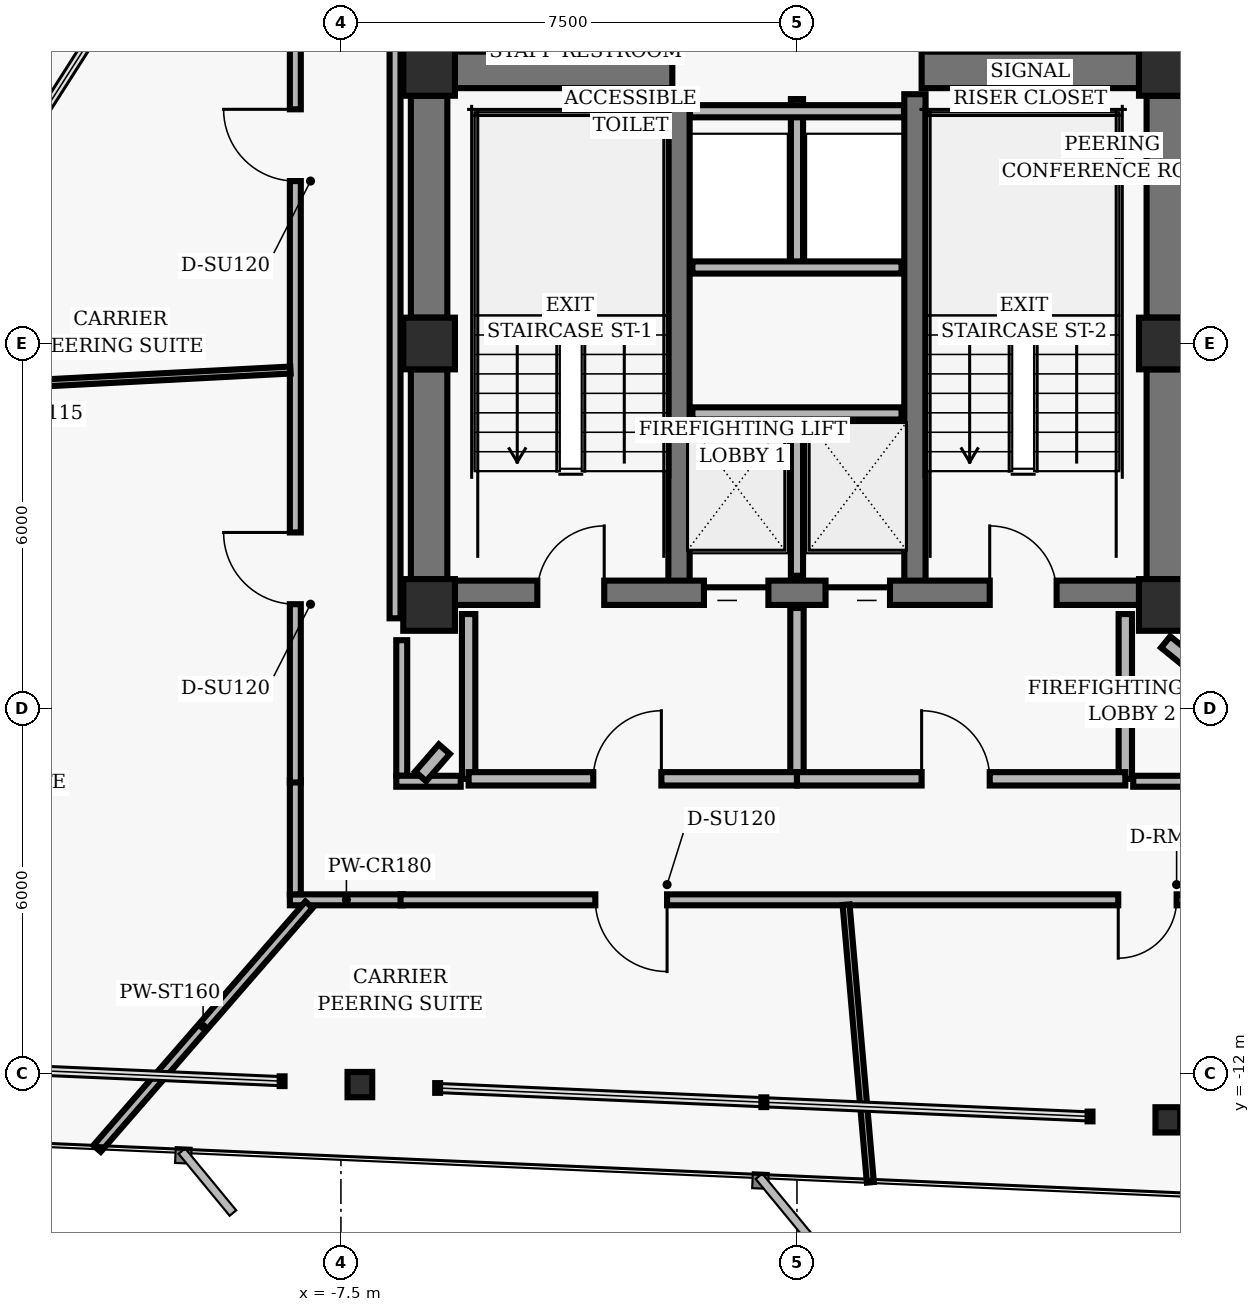
"""IFC4 building model, lengths in metres.
Left out: names, types, materials, properties, quantities, classifications, styles, units other than length and angle.
Written with IfcOpenShell. Run it as: python <this file> out.ifc"""

import sys

from ifc_helpers import new_model, si_unit, direction, frame, frame_2d, origin, origin_2d, place, context, subcontext, project, spatial, rectangle, hollow_rectangle, i_section, extrude, element, fill, save


model = new_model("IFC4")
c1 = context("Model", 3, precision=1e-05, world=origin(), true_north=direction((0.0, 1.0)))
c2 = subcontext(c1, "Body", "Model", "MODEL_VIEW")
j1 = project(units=[si_unit("LENGTHUNIT", "METRE"), si_unit("PLANEANGLEUNIT", "RADIAN")], contexts=[c1])
p1 = place(None, origin())
s1 = spatial("IfcSite", under=j1, at=p1, CompositionType="ELEMENT")
p2 = place(p1, origin())
s2 = spatial("IfcBuilding", under=s1, at=p2, CompositionType="ELEMENT")
p3 = place(p2, frame((0.0, 0.0, 128.96)))
s3 = spatial("IfcBuildingStorey", under=s2, at=p3, CompositionType="ELEMENT", Elevation=128.96)
for number, where, z_axis, x_axis in (
    (1, (-6.05, 4.5, 0.0), (0.0, 0.0, 1.0), (1.0, 0.0, 0.0)),
    (2, (6.05, 4.5, 0.0), (0.0, 0.0, 1.0), (1.0, 0.0, 0.0)),
    (3, (-6.05, 0.0, 0.0), (0.0, 0.0, 1.0), (1.0, 0.0, 0.0)),
    (4, (6.05, 0.0, 0.0), (0.0, 0.0, 1.0), (1.0, 0.0, 0.0)),
    (5, (-6.05, -4.3, 0.0), (0.0, 0.0, 1.0), (1.0, 0.0, 0.0)),
    (6, (6.05, -4.3, 0.0), (0.0, 0.0, 1.0), (1.0, 0.0, 0.0)),
):
    element("IfcColumn", number, at=place(p3, frame(where, z_axis=z_axis, x_axis=x_axis)), inside=s3, PredefinedType="COLUMN", context=c2, shape_type="SweptSolid", body=[
        extrude(hollow_rectangle(XDim=0.85, YDim=0.85, WallThickness=0.055, InnerFilletRadius=0.02, OuterFilletRadius=0.04, at=origin_2d()), origin(), (0.0, 0.0, 1.0), 3.04),
    ])
p4 = place(p3, frame((-6.05, 0.425, 0.0), z_axis=(0.0, 0.0, 1.0), x_axis=(0.0, 1.0, 0.0)))
e7 = element("IfcWall", 7, at=p4, inside=s3, PredefinedType="SHEAR", context=c2, shape_type="SweptSolid", body=[
    extrude(rectangle(XDim=3.65, YDim=0.6, at=frame_2d((1.825, 0.0))), origin(), (0.0, 0.0, 1.0), 2.788),
])
p5 = place(p3, frame((-6.05, -3.875, 0.0), z_axis=(0.0, 0.0, 1.0), x_axis=(0.0, 1.0, 0.0)))
e8 = element("IfcWall", 8, at=p5, inside=s3, PredefinedType="SHEAR", context=c2, shape_type="SweptSolid", body=[
    extrude(rectangle(XDim=3.45, YDim=0.6, at=frame_2d((1.725, 0.0))), origin(), (0.0, 0.0, 1.0), 2.788),
])
p6 = place(p3, frame((6.05, 0.425, 0.0), z_axis=(0.0, 0.0, 1.0), x_axis=(0.0, 1.0, 0.0)))
e9 = element("IfcWall", 9, at=p6, inside=s3, PredefinedType="SHEAR", context=c2, shape_type="SweptSolid", body=[
    extrude(rectangle(XDim=3.65, YDim=0.6, at=frame_2d((1.825, 0.0))), origin(), (0.0, 0.0, 1.0), 2.788),
])
p7 = place(p3, frame((6.05, -3.875, 0.0), z_axis=(0.0, 0.0, 1.0), x_axis=(0.0, 1.0, 0.0)))
e10 = element("IfcWall", 10, at=p7, inside=s3, PredefinedType="SHEAR", context=c2, shape_type="SweptSolid", body=[
    extrude(rectangle(XDim=3.45, YDim=0.6, at=frame_2d((1.725, 0.0))), origin(), (0.0, 0.0, 1.0), 2.788),
])
for number, where, z_axis, x_axis in (
    (11, (-1.94, -4.1, 0.0), (0.0, 0.0, 1.0), (0.0, 1.0, 0.0)),
    (12, (1.94, -4.1, 0.0), (0.0, 0.0, 1.0), (0.0, 1.0, 0.0)),
):
    element("IfcWall", number, at=place(p3, frame(where, z_axis=z_axis, x_axis=x_axis)), inside=s3, PredefinedType="SHEAR", context=c2, shape_type="SweptSolid", body=[
        extrude(rectangle(XDim=8.2, YDim=0.35, at=frame_2d((4.1, 0.0))), origin(), (0.0, 0.0, 1.0), 2.788),
    ])
p8 = place(p3, frame((-5.625, -4.1, 0.0), z_axis=(0.0, 0.0, 1.0), x_axis=(1.0, 0.0, 0.0)))
e13 = element("IfcWall", 13, at=p8, inside=s3, PredefinedType="SHEAR", context=c2, shape_type="SweptSolid", body=[
    extrude(rectangle(XDim=11.25, YDim=0.4, at=frame_2d((5.625, 0.0))), origin(), (0.0, 0.0, 1.0), 2.788),
])
p9 = place(p8, frame((1.355, 0.0, 0.0)))
e14 = element("IfcOpeningElement", 14, at=p9, cuts=e13, PredefinedType="OPENING", context=c2, shape_type="SweptSolid", body=[
    extrude(rectangle(XDim=1.1, YDim=2.04, at=frame_2d((0.55, 1.02))), frame((0.0, 0.21, 0.0), z_axis=(0.0, -1.0, 0.0), x_axis=(1.0, 0.0, 0.0)), (0.0, 0.0, 1.0), 0.42),
])
p10 = place(p8, frame((8.795, 0.0, 0.0)))
e15 = element("IfcOpeningElement", 15, at=p10, cuts=e13, PredefinedType="OPENING", context=c2, shape_type="SweptSolid", body=[
    extrude(rectangle(XDim=1.1, YDim=2.04, at=frame_2d((0.55, 1.02))), frame((0.0, 0.21, 0.0), z_axis=(0.0, -1.0, 0.0), x_axis=(1.0, 0.0, 0.0)), (0.0, 0.0, 1.0), 0.42),
])
p11 = place(p8, frame((4.095, 0.0, 0.0)))
e16 = element("IfcOpeningElement", 16, at=p11, cuts=e13, PredefinedType="OPENING", context=c2, shape_type="SweptSolid", body=[
    extrude(rectangle(XDim=1.06, YDim=2.04, at=frame_2d((0.53, 1.02))), frame((0.0, 0.21, 0.0), z_axis=(0.0, -1.0, 0.0), x_axis=(1.0, 0.0, 0.0)), (0.0, 0.0, 1.0), 0.42),
])
p12 = place(p8, frame((6.095, 0.0, 0.0)))
e17 = element("IfcOpeningElement", 17, at=p12, cuts=e13, PredefinedType="OPENING", context=c2, shape_type="SweptSolid", body=[
    extrude(rectangle(XDim=1.06, YDim=2.04, at=frame_2d((0.53, 1.02))), frame((0.0, 0.21, 0.0), z_axis=(0.0, -1.0, 0.0), x_axis=(1.0, 0.0, 0.0)), (0.0, 0.0, 1.0), 0.42),
])
for number, where, z_axis, x_axis in (
    (18, (-5.625, 4.5, 0.0), (0.0, 0.0, 1.0), (1.0, 0.0, 0.0)),
    (19, (2.05, 4.5, 0.0), (0.0, 0.0, 1.0), (1.0, 0.0, 0.0)),
):
    element("IfcWall", number, at=place(p3, frame(where, z_axis=z_axis, x_axis=x_axis)), inside=s3, PredefinedType="SHEAR", context=c2, shape_type="SweptSolid", body=[
        extrude(rectangle(XDim=3.575, YDim=0.6, at=frame_2d((1.788, 0.0))), origin(), (0.0, 0.0, 1.0), 2.788),
    ])
for number, where, z_axis, x_axis in (
    (20, (-7.188, -12.189, 0.0), (0.0, 0.0, 1.0), (1.0, 0.0, 0.0)),
    (21, (6.099, -12.769, 0.0), (0.0, 0.0, 1.0), (1.0, 0.0, 0.0)),
):
    element("IfcColumn", number, at=place(p3, frame(where, z_axis=z_axis, x_axis=x_axis)), inside=s3, PredefinedType="COLUMN", context=c2, shape_type="SweptSolid", body=[
        extrude(i_section(OverallWidth=0.406, OverallDepth=0.416, WebThickness=0.03, FlangeThickness=0.048, FilletRadius=0.02, at=origin_2d()), origin(), (0.0, 0.0, 1.0), 3.04),
    ])
p13 = place(p3, frame((0.0, -3.82, 0.0), z_axis=(0.0, 0.0, 1.0), x_axis=(0.0, 1.0, 0.0)))
e22 = element("IfcWall", 22, at=p13, inside=s3, PredefinedType="PARTITIONING", context=c2, shape_type="SweptSolid", body=[
    extrude(rectangle(XDim=2.67, YDim=0.2, at=frame_2d((1.335, 0.0))), origin(), (0.0, 0.0, 1.0), 2.763),
])
p14 = place(p3, frame((-1.72, -1.15, 0.0), z_axis=(0.0, 0.0, 1.0), x_axis=(1.0, 0.0, 0.0)))
e23 = element("IfcWall", 23, at=p14, inside=s3, PredefinedType="PARTITIONING", context=c2, shape_type="SweptSolid", body=[
    extrude(rectangle(XDim=3.44, YDim=0.2, at=frame_2d((1.72, 0.0))), origin(), (0.0, 0.0, 1.0), 2.763),
])
for number, where, z_axis, x_axis in (
    (24, (-5.4, -7.16, 0.0), (0.0, 0.0, 1.0), (0.0, 1.0, 0.0)),
    (25, (5.4, -7.16, 0.0), (0.0, 0.0, 1.0), (0.0, 1.0, 0.0)),
):
    element("IfcWall", number, at=place(p3, frame(where, z_axis=z_axis, x_axis=x_axis)), inside=s3, PredefinedType="PARTITIONING", context=c2, shape_type="SweptSolid", body=[
        extrude(rectangle(XDim=2.71, YDim=0.22, at=frame_2d((1.355, 0.0))), origin(), (0.0, 0.0, 1.0), 2.763),
    ])
p15 = place(p3, frame((0.0, -7.16, 0.0), z_axis=(0.0, 0.0, 1.0), x_axis=(0.0, 1.0, 0.0)))
e26 = element("IfcWall", 26, at=p15, inside=s3, PredefinedType="PARTITIONING", context=c2, shape_type="SweptSolid", body=[
    extrude(rectangle(XDim=2.81, YDim=0.22, at=frame_2d((1.405, 0.0))), origin(), (0.0, 0.0, 1.0), 2.763),
])
p16 = place(p3, frame((-5.4, -7.16, 0.0), z_axis=(0.0, 0.0, 1.0), x_axis=(1.0, 0.0, 0.0)))
e27 = element("IfcWall", 27, at=p16, inside=s3, PredefinedType="PARTITIONING", context=c2, shape_type="SweptSolid", body=[
    extrude(rectangle(XDim=5.4, YDim=0.22, at=frame_2d((2.7, 0.0))), origin(), (0.0, 0.0, 1.0), 2.33),
])
p17 = place(p16, frame((2.05, 0.0, 0.0)))
e28 = element("IfcOpeningElement", 28, at=p17, cuts=e27, PredefinedType="OPENING", context=c2, shape_type="SweptSolid", body=[
    extrude(rectangle(XDim=1.12, YDim=2.02, at=frame_2d((0.56, 1.01))), frame((0.0, 0.12, 0.0), z_axis=(0.0, -1.0, 0.0), x_axis=(1.0, 0.0, 0.0)), (0.0, 0.0, 1.0), 0.24),
])
p18 = place(p3, frame((0.0, -7.16, 0.0), z_axis=(0.0, 0.0, 1.0), x_axis=(1.0, 0.0, 0.0)))
e29 = element("IfcWall", 29, at=p18, inside=s3, PredefinedType="PARTITIONING", context=c2, shape_type="SweptSolid", body=[
    extrude(rectangle(XDim=5.4, YDim=0.22, at=frame_2d((2.7, 0.0))), origin(), (0.0, 0.0, 1.0), 2.33),
])
p19 = place(p18, frame((2.05, 0.0, 0.0)))
e30 = element("IfcOpeningElement", 30, at=p19, cuts=e29, PredefinedType="OPENING", context=c2, shape_type="SweptSolid", body=[
    extrude(rectangle(XDim=1.12, YDim=2.02, at=frame_2d((0.56, 1.01))), frame((0.0, 0.12, 0.0), z_axis=(0.0, -1.0, 0.0), x_axis=(1.0, 0.0, 0.0)), (0.0, 0.0, 1.0), 0.24),
])
p20 = place(p3, frame((0.0, 1.25, 0.0), z_axis=(0.0, 0.0, 1.0), x_axis=(0.0, 1.0, 0.0)))
e31 = element("IfcWall", 31, at=p20, inside=s3, PredefinedType="PARTITIONING", context=c2, shape_type="SweptSolid", body=[
    extrude(rectangle(XDim=2.77, YDim=0.2, at=frame_2d((1.385, 0.0))), origin(), (0.0, 0.0, 1.0), 2.763),
])
p21 = place(p3, frame((-1.72, 1.25, 0.0), z_axis=(0.0, 0.0, 1.0), x_axis=(1.0, 0.0, 0.0)))
e32 = element("IfcWall", 32, at=p21, inside=s3, PredefinedType="PARTITIONING", context=c2, shape_type="SweptSolid", body=[
    extrude(rectangle(XDim=3.44, YDim=0.2, at=frame_2d((1.72, 0.0))), origin(), (0.0, 0.0, 1.0), 2.763),
])
p22 = place(p3, frame((-1.76, 3.82, 0.0), z_axis=(0.0, 0.0, 1.0), x_axis=(1.0, 0.0, 0.0)))
e33 = element("IfcWall", 33, at=p22, inside=s3, PredefinedType="PARTITIONING", context=c2, shape_type="SweptSolid", body=[
    extrude(rectangle(XDim=3.52, YDim=0.2, at=frame_2d((1.76, 0.0))), origin(), (0.0, 0.0, 1.0), 2.763),
])
p23 = place(p3, frame((-6.48, -9.15, 0.0), z_axis=(0.0, 0.0, 1.0), x_axis=(-1.0, 0.0, 0.0)))
e34 = element("IfcWall", 34, at=p23, inside=s3, PredefinedType="PARTITIONING", context=c2, shape_type="SweptSolid", body=[
    extrude(rectangle(XDim=1.86, YDim=0.18, at=frame_2d((0.93, 0.0))), origin(), (0.0, 0.0, 1.0), 2.33),
])
p24 = place(p3, frame((-8.25, -9.06, 0.0), z_axis=(0.0, 0.0, 1.0), x_axis=(0.0, 1.0, 0.0)))
e35 = element("IfcWall", 35, at=p24, inside=s3, PredefinedType="PARTITIONING", context=c2, shape_type="SweptSolid", body=[
    extrude(rectangle(XDim=1.88, YDim=0.18, at=frame_2d((0.94, 0.0))), origin(), (0.0, 0.0, 1.0), 2.763),
])
p25 = place(p3, frame((-8.25, -7.22, 0.0), z_axis=(0.0, 0.0, 1.0), x_axis=(0.0, 1.0, 0.0)))
e36 = element("IfcWall", 36, at=p25, inside=s3, PredefinedType="PARTITIONING", context=c2, shape_type="SweptSolid", body=[
    extrude(rectangle(XDim=14.44, YDim=0.18, at=frame_2d((7.22, 0.0))), origin(), (0.0, 0.0, 1.0), 2.763),
])
p26 = place(p25, frame((2.932, 0.0, 0.0)))
e37 = element("IfcOpeningElement", 37, at=p26, cuts=e36, PredefinedType="OPENING", context=c2, shape_type="SweptSolid", body=[
    extrude(rectangle(XDim=1.18, YDim=2.02, at=frame_2d((0.59, 1.01))), frame((0.0, 0.1, 0.0), z_axis=(0.0, -1.0, 0.0), x_axis=(1.0, 0.0, 0.0)), (0.0, 0.0, 1.0), 0.2),
])
p27 = place(p25, frame((9.892, 0.0, 0.0)))
e38 = element("IfcOpeningElement", 38, at=p27, cuts=e36, PredefinedType="OPENING", context=c2, shape_type="SweptSolid", body=[
    extrude(rectangle(XDim=1.18, YDim=2.02, at=frame_2d((0.59, 1.01))), frame((0.0, 0.1, 0.0), z_axis=(0.0, -1.0, 0.0), x_axis=(1.0, 0.0, 0.0)), (0.0, 0.0, 1.0), 0.2),
])
p28 = place(p3, frame((10.98, -9.15, 0.0), z_axis=(0.0, 0.0, 1.0), x_axis=(-1.0, 0.0, 0.0)))
e39 = element("IfcWall", 39, at=p28, inside=s3, PredefinedType="PARTITIONING", context=c2, shape_type="SweptSolid", body=[
    extrude(rectangle(XDim=17.5, YDim=0.18, at=frame_2d((8.75, 0.0))), origin(), (0.0, 0.0, 1.0), 2.33),
])
p29 = place(p28, frame((13.116, 0.0, 0.0)))
e40 = element("IfcOpeningElement", 40, at=p29, cuts=e39, PredefinedType="OPENING", context=c2, shape_type="SweptSolid", body=[
    extrude(rectangle(XDim=1.18, YDim=2.02, at=frame_2d((0.59, 1.01))), frame((0.0, 0.1, 0.0), z_axis=(0.0, -1.0, 0.0), x_axis=(1.0, 0.0, 0.0)), (0.0, 0.0, 1.0), 0.2),
])
p30 = place(p28, frame((4.736, 0.0, 0.0)))
e41 = element("IfcOpeningElement", 41, at=p30, cuts=e39, PredefinedType="OPENING", context=c2, shape_type="SweptSolid", body=[
    extrude(rectangle(XDim=0.96, YDim=2.02, at=frame_2d((0.48, 1.01))), frame((0.0, 0.1, 0.0), z_axis=(0.0, -1.0, 0.0), x_axis=(1.0, 0.0, 0.0)), (0.0, 0.0, 1.0), 0.2),
])
p31 = place(p3, frame((5.53, -7.2, 0.0), z_axis=(0.0, 0.0, 1.0), x_axis=(1.0, 0.0, 0.0)))
e42 = element("IfcWall", 42, at=p31, inside=s3, PredefinedType="PARTITIONING", context=c2, shape_type="SweptSolid", body=[
    extrude(rectangle(XDim=5.52, YDim=0.18, at=frame_2d((2.76, 0.0))), origin(), (0.0, 0.0, 1.0), 2.33),
])
p32 = place(p3, frame((-6.61, 4.94, 0.0), z_axis=(0.0, 0.0, 1.0), x_axis=(0.0, -1.0, 0.0)))
e43 = element("IfcWall", 43, at=p32, inside=s3, PredefinedType="PARTITIONING", context=c2, shape_type="SweptSolid", body=[
    extrude(rectangle(XDim=9.46, YDim=0.18, at=frame_2d((4.73, 0.0))), origin(), (0.0, 0.0, 1.0), 2.763),
])
p33 = place(p3, frame((-6.5, -4.88, 0.0), z_axis=(0.0, 0.0, 1.0), x_axis=(0.0, -1.0, 0.0)))
e44 = element("IfcWall", 44, at=p33, inside=s3, PredefinedType="PARTITIONING", context=c2, shape_type="SweptSolid", body=[
    extrude(rectangle(XDim=2.23, YDim=0.18, at=frame_2d((1.115, 0.0))), origin(), (0.0, 0.0, 1.0), 2.132),
])
p34 = place(p3, frame((-6.59, -7.2, 0.0), z_axis=(0.0, 0.0, 1.0), x_axis=(1.0, 0.0, 0.0)))
e45 = element("IfcWall", 45, at=p34, inside=s3, PredefinedType="PARTITIONING", context=c2, shape_type="SweptSolid", body=[
    extrude(rectangle(XDim=1.06, YDim=0.18, at=frame_2d((0.53, 0.0))), origin(), (0.0, 0.0, 1.0), 2.33),
])
p35 = place(p3, frame((-8.33, -0.437, 0.0), z_axis=(0.0, 0.0, 1.0), x_axis=(-0.998628646782, -0.052352897024, 0.0)))
e46 = element("IfcWall", 46, at=p35, inside=s3, PredefinedType="MOVABLE", context=c2, shape_type="SweptSolid", body=[
    extrude(rectangle(XDim=8.525, YDim=0.115, at=frame_2d((4.262, 0.0))), origin(), (0.0, 0.0, 1.0), 2.763),
])
p36 = place(p3, frame((-5.8, -6.672, 0.0), z_axis=(0.0, 0.0, 1.0), x_axis=(-0.655791573116, -0.754941992891, 0.0)))
e47 = element("IfcWall", 47, at=p36, inside=s3, PredefinedType="PARTITIONING", context=c2, shape_type="SweptSolid", body=[
    extrude(rectangle(XDim=0.594, YDim=0.24, at=frame_2d((0.297, 0.0))), origin(), (0.0, 0.0, 1.0), 2.763),
])
p37 = place(p3, frame((-8.023, -9.23, 0.0), z_axis=(0.0, 0.0, 1.0), x_axis=(-0.656052478168, -0.754715274716, 0.0)))
e48 = element("IfcWall", 48, at=p37, inside=s3, PredefinedType="PARTITIONING", context=c2, shape_type="SweptSolid", body=[
    extrude(rectangle(XDim=5.315, YDim=0.16, at=frame_2d((2.658, 0.0))), origin(), (0.0, 0.0, 1.0), 2.763),
])
p38 = place(p3, frame((0.808, -9.23, 0.0), z_axis=(0.0, 0.0, 1.0), x_axis=(0.087130613331, -0.996196896311, 0.0)))
e49 = element("IfcWall", 49, at=p38, inside=s3, PredefinedType="MOVABLE", context=c2, shape_type="SweptSolid", body=[
    extrude(rectangle(XDim=4.584, YDim=0.115, at=frame_2d((2.292, 0.0))), origin(), (0.0, 0.0, 1.0), 2.763),
])
p39 = place(p3, frame((6.063, -4.91, 0.0), z_axis=(0.0, 0.0, 1.0), x_axis=(0.777131535724, -0.629338204929, 0.0)))
e50 = element("IfcWall", 50, at=p39, inside=s3, PredefinedType="PARTITIONING", context=c2, shape_type="SweptSolid", body=[
    extrude(rectangle(XDim=3.512, YDim=0.24, at=frame_2d((1.756, 0.0))), origin(), (0.0, 0.0, 1.0), 2.763),
])
p40 = place(p9, origin())
e51 = element("IfcDoor", 51, at=p40, inside=s3, OperationType="SINGLE_SWING_RIGHT", PredefinedType="DOOR", context=c2, shape_type="SweptSolid", body=[
    extrude(rectangle(XDim=1.1, YDim=2.04, at=frame_2d((0.55, 1.02))), frame((0.0, 0.025, 0.0), z_axis=(0.0, -1.0, 0.0), x_axis=(1.0, 0.0, 0.0)), (0.0, 0.0, 1.0), 0.05),
])
fill(e14, e51)
p41 = place(p10, origin())
e52 = element("IfcDoor", 52, at=p41, inside=s3, OperationType="SINGLE_SWING_LEFT", PredefinedType="DOOR", context=c2, shape_type="SweptSolid", body=[
    extrude(rectangle(XDim=1.1, YDim=2.04, at=frame_2d((0.55, 1.02))), frame((0.0, 0.025, 0.0), z_axis=(0.0, -1.0, 0.0), x_axis=(1.0, 0.0, 0.0)), (0.0, 0.0, 1.0), 0.05),
])
fill(e15, e52)
p42 = place(p11, origin())
e53 = element("IfcDoor", 53, at=p42, inside=s3, OperationType="SLIDING_TO_LEFT", PredefinedType="DOOR", context=c2, shape_type="SweptSolid", body=[
    extrude(rectangle(XDim=1.06, YDim=2.04, at=frame_2d((0.53, 1.02))), frame((0.0, 0.025, 0.0), z_axis=(0.0, -1.0, 0.0), x_axis=(1.0, 0.0, 0.0)), (0.0, 0.0, 1.0), 0.05),
])
fill(e16, e53)
p43 = place(p12, origin())
e54 = element("IfcDoor", 54, at=p43, inside=s3, OperationType="SLIDING_TO_RIGHT", PredefinedType="DOOR", context=c2, shape_type="SweptSolid", body=[
    extrude(rectangle(XDim=1.06, YDim=2.04, at=frame_2d((0.53, 1.02))), frame((0.0, 0.025, 0.0), z_axis=(0.0, -1.0, 0.0), x_axis=(1.0, 0.0, 0.0)), (0.0, 0.0, 1.0), 0.05),
])
fill(e17, e54)
p44 = place(p17, origin())
e55 = element("IfcDoor", 55, at=p44, inside=s3, OperationType="SINGLE_SWING_RIGHT", PredefinedType="DOOR", context=c2, shape_type="SweptSolid", body=[
    extrude(rectangle(XDim=1.12, YDim=2.02, at=frame_2d((0.56, 1.01))), frame((0.0, 0.025, 0.0), z_axis=(0.0, -1.0, 0.0), x_axis=(1.0, 0.0, 0.0)), (0.0, 0.0, 1.0), 0.05),
])
fill(e28, e55)
p45 = place(p19, origin())
e56 = element("IfcDoor", 56, at=p45, inside=s3, OperationType="SINGLE_SWING_LEFT", PredefinedType="DOOR", context=c2, shape_type="SweptSolid", body=[
    extrude(rectangle(XDim=1.12, YDim=2.02, at=frame_2d((0.56, 1.01))), frame((0.0, 0.025, 0.0), z_axis=(0.0, -1.0, 0.0), x_axis=(1.0, 0.0, 0.0)), (0.0, 0.0, 1.0), 0.05),
])
fill(e30, e56)
p46 = place(p26, origin())
e57 = element("IfcDoor", 57, at=p46, inside=s3, OperationType="SINGLE_SWING_RIGHT", PredefinedType="DOOR", context=c2, shape_type="SweptSolid", body=[
    extrude(rectangle(XDim=1.18, YDim=2.02, at=frame_2d((0.59, 1.01))), frame((0.0, 0.025, 0.0), z_axis=(0.0, -1.0, 0.0), x_axis=(1.0, 0.0, 0.0)), (0.0, 0.0, 1.0), 0.05),
])
fill(e37, e57)
p47 = place(p29, origin())
e58 = element("IfcDoor", 58, at=p47, inside=s3, OperationType="SINGLE_SWING_LEFT", PredefinedType="DOOR", context=c2, shape_type="SweptSolid", body=[
    extrude(rectangle(XDim=1.18, YDim=2.02, at=frame_2d((0.59, 1.01))), frame((0.0, 0.025, 0.0), z_axis=(0.0, -1.0, 0.0), x_axis=(1.0, 0.0, 0.0)), (0.0, 0.0, 1.0), 0.05),
])
fill(e40, e58)
p48 = place(p30, origin())
e59 = element("IfcDoor", 59, at=p48, inside=s3, OperationType="SINGLE_SWING_RIGHT", PredefinedType="DOOR", context=c2, shape_type="SweptSolid", body=[
    extrude(rectangle(XDim=0.96, YDim=2.02, at=frame_2d((0.48, 1.01))), frame((0.0, 0.025, 0.0), z_axis=(0.0, -1.0, 0.0), x_axis=(1.0, 0.0, 0.0)), (0.0, 0.0, 1.0), 0.05),
])
fill(e41, e59)
p49 = place(p27, origin())
e60 = element("IfcDoor", 60, at=p49, inside=s3, OperationType="SINGLE_SWING_RIGHT", PredefinedType="DOOR", context=c2, shape_type="SweptSolid", body=[
    extrude(rectangle(XDim=1.18, YDim=2.02, at=frame_2d((0.59, 1.01))), frame((0.0, 0.025, 0.0), z_axis=(0.0, -1.0, 0.0), x_axis=(1.0, 0.0, 0.0)), (0.0, 0.0, 1.0), 0.05),
])
fill(e38, e60)
save(model, sys.argv[1])
